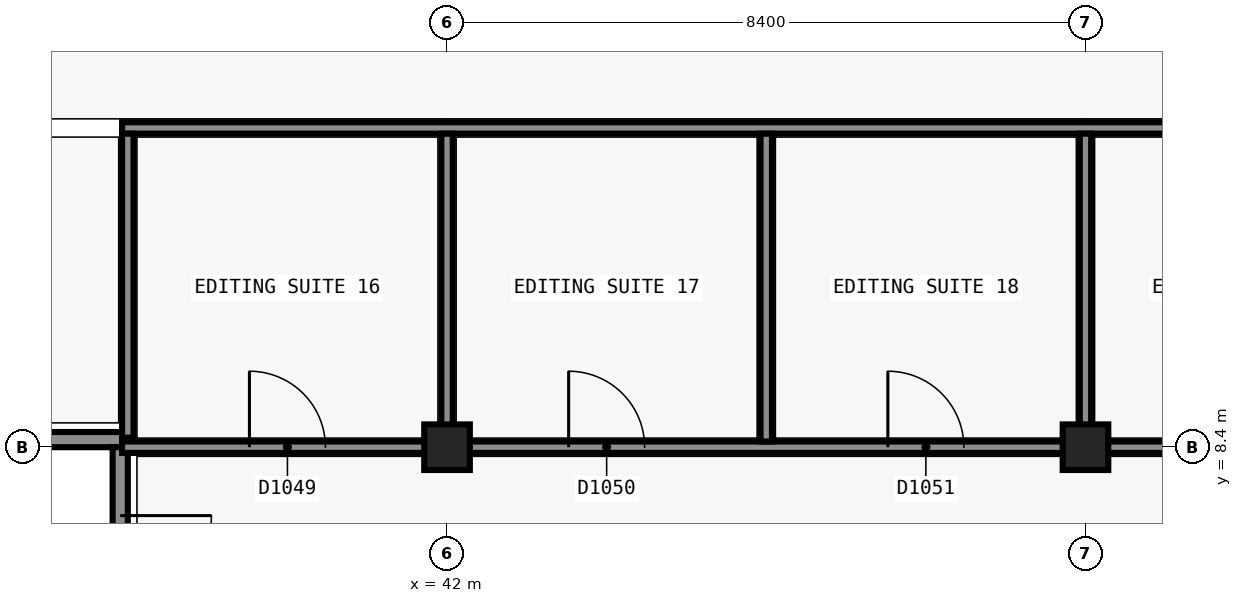
"""IFC4 building model, lengths in metres.
Left out: names, types, materials, properties, quantities, classifications, styles, units other than length and angle.
Written with IfcOpenShell. Run it as: python <this file> out.ifc"""

import sys

from ifc_helpers import new_model, si_unit, direction, frame, frame_2d, origin, origin_2d, place, context, subcontext, project, spatial, rectangle, extrude, element, fill, save


model = new_model("IFC4")
c1 = context("Model", 3, precision=1e-05, world=origin(), true_north=direction((0.0, 1.0)))
c2 = subcontext(c1, "Body", "Model", "MODEL_VIEW")
j1 = project(units=[si_unit("LENGTHUNIT", "METRE"), si_unit("PLANEANGLEUNIT", "RADIAN")], contexts=[c1])
p1 = place(None, origin())
s1 = spatial("IfcSite", under=j1, at=p1, CompositionType="ELEMENT")
p2 = place(p1, origin())
s2 = spatial("IfcBuilding", under=s1, at=p2, CompositionType="ELEMENT")
p3 = place(p2, frame((0.0, 0.0, 5.4)))
s3 = spatial("IfcBuildingStorey", under=s2, at=p3, CompositionType="ELEMENT", Elevation=5.4)
p4 = place(p3, frame((33.9, 8.5, 0.0), z_axis=(0.0, 0.0, 1.0), x_axis=(1.0, 0.0, 0.0)))
e1 = element("IfcWall", 1, at=p4, inside=s3, PredefinedType="SHEAR", context=c2, shape_type="SweptSolid", body=[
    extrude(rectangle(XDim=3.9, YDim=0.2, at=frame_2d((1.95, 0.0))), origin(), (0.0, 0.0, 1.0), 4.8),
])
p5 = place(p4, frame((1.2, 0.0, 0.0)))
e2 = element("IfcOpeningElement", 2, at=p5, cuts=e1, PredefinedType="OPENING", context=c2, shape_type="SweptSolid", body=[
    extrude(rectangle(XDim=1.2, YDim=2.1, at=frame_2d((0.6, 1.05))), frame((0.0, 0.11, 0.0), z_axis=(0.0, -1.0, 0.0), x_axis=(1.0, 0.0, 0.0)), (0.0, 0.0, 1.0), 0.22),
])
p6 = place(p3, frame((37.7, 8.4, 0.0), z_axis=(0.0, 0.0, 1.0), x_axis=(0.0, -1.0, 0.0)))
e3 = element("IfcWall", 3, at=p6, inside=s3, PredefinedType="SHEAR", context=c2, shape_type="SweptSolid", body=[
    extrude(rectangle(XDim=8.2, YDim=0.2, at=frame_2d((4.1, 0.0))), origin(), (0.0, 0.0, 1.0), 4.8),
])
p7 = place(p6, frame((0.9, 0.0, 0.0)))
e4 = element("IfcOpeningElement", 4, at=p7, cuts=e3, PredefinedType="OPENING", context=c2, shape_type="SweptSolid", body=[
    extrude(rectangle(XDim=1.2, YDim=2.1, at=frame_2d((0.6, 1.05))), frame((0.0, 0.11, 0.0), z_axis=(0.0, -1.0, 0.0), x_axis=(1.0, 0.0, 0.0)), (0.0, 0.0, 1.0), 0.22),
])
for number, where, z_axis, x_axis in (
    (5, (42.0, 8.4, 0.0), (0.0, 0.0, 1.0), (1.0, 0.0, 0.0)),
    (6, (50.4, 8.4, 0.0), (0.0, 0.0, 1.0), (1.0, 0.0, 0.0)),
):
    element("IfcColumn", number, at=place(p3, frame(where, z_axis=z_axis, x_axis=x_axis)), inside=s3, PredefinedType="COLUMN", context=c2, shape_type="SweptSolid", body=[
        extrude(rectangle(XDim=0.6, YDim=0.6, at=origin_2d()), origin(), (0.0, 0.0, 1.0), 4.8),
    ])
p8 = place(p3, frame((37.725, 8.4, 0.0), z_axis=(0.0, 0.0, 1.0), x_axis=(1.0, 0.0, 0.0)))
e7 = element("IfcWall", 7, at=p8, inside=s3, PredefinedType="PARTITIONING", context=c2, shape_type="SweptSolid", body=[
    extrude(rectangle(XDim=20.375, YDim=0.15, at=frame_2d((10.188, 0.0))), origin(), (0.0, 0.0, 1.0), 3.8),
])
p9 = place(p8, frame((1.675, 0.0, 0.0)))
e8 = element("IfcOpeningElement", 8, at=p9, cuts=e7, PredefinedType="OPENING", context=c2, shape_type="SweptSolid", body=[
    extrude(rectangle(XDim=1.0, YDim=2.1, at=frame_2d((0.5, 1.05))), frame((0.0, 0.085, 0.0), z_axis=(0.0, -1.0, 0.0), x_axis=(1.0, 0.0, 0.0)), (0.0, 0.0, 1.0), 0.17),
])
p10 = place(p8, frame((5.875, 0.0, 0.0)))
e9 = element("IfcOpeningElement", 9, at=p10, cuts=e7, PredefinedType="OPENING", context=c2, shape_type="SweptSolid", body=[
    extrude(rectangle(XDim=1.0, YDim=2.1, at=frame_2d((0.5, 1.05))), frame((0.0, 0.085, 0.0), z_axis=(0.0, -1.0, 0.0), x_axis=(1.0, 0.0, 0.0)), (0.0, 0.0, 1.0), 0.17),
])
p11 = place(p8, frame((10.075, 0.0, 0.0)))
e10 = element("IfcOpeningElement", 10, at=p11, cuts=e7, PredefinedType="OPENING", context=c2, shape_type="SweptSolid", body=[
    extrude(rectangle(XDim=1.0, YDim=2.1, at=frame_2d((0.5, 1.05))), frame((0.0, 0.085, 0.0), z_axis=(0.0, -1.0, 0.0), x_axis=(1.0, 0.0, 0.0)), (0.0, 0.0, 1.0), 0.17),
])
p12 = place(p8, frame((14.275, 0.0, 0.0)))
e11 = element("IfcOpeningElement", 11, at=p12, cuts=e7, PredefinedType="OPENING", context=c2, shape_type="SweptSolid", body=[
    extrude(rectangle(XDim=1.0, YDim=2.1, at=frame_2d((0.5, 1.05))), frame((0.0, 0.085, 0.0), z_axis=(0.0, -1.0, 0.0), x_axis=(1.0, 0.0, 0.0)), (0.0, 0.0, 1.0), 0.17),
])
p13 = place(p8, frame((18.475, 0.0, 0.0)))
e12 = element("IfcOpeningElement", 12, at=p13, cuts=e7, PredefinedType="OPENING", context=c2, shape_type="SweptSolid", body=[
    extrude(rectangle(XDim=1.0, YDim=2.1, at=frame_2d((0.5, 1.05))), frame((0.0, 0.085, 0.0), z_axis=(0.0, -1.0, 0.0), x_axis=(1.0, 0.0, 0.0)), (0.0, 0.0, 1.0), 0.17),
])
p14 = place(p3, frame((37.725, 12.6, 0.0), z_axis=(0.0, 0.0, 1.0), x_axis=(1.0, 0.0, 0.0)))
e13 = element("IfcWall", 13, at=p14, inside=s3, PredefinedType="PARTITIONING", context=c2, shape_type="SweptSolid", body=[
    extrude(rectangle(XDim=20.375, YDim=0.15, at=frame_2d((10.188, 0.0))), origin(), (0.0, 0.0, 1.0), 3.8),
])
p15 = place(p3, frame((37.8, 8.525, 0.0), z_axis=(0.0, 0.0, 1.0), x_axis=(0.0, 1.0, 0.0)))
e14 = element("IfcWall", 14, at=p15, inside=s3, PredefinedType="PARTITIONING", context=c2, shape_type="SweptSolid", body=[
    extrude(rectangle(XDim=4.0, YDim=0.15, at=frame_2d((2.0, 0.0))), origin(), (0.0, 0.0, 1.0), 4.0),
])
for number, where, z_axis, x_axis in (
    (15, (42.0, 8.475, 0.0), (0.0, 0.0, 1.0), (0.0, 1.0, 0.0)),
    (16, (46.2, 8.475, 0.0), (0.0, 0.0, 1.0), (0.0, 1.0, 0.0)),
    (17, (50.4, 8.475, 0.0), (0.0, 0.0, 1.0), (0.0, 1.0, 0.0)),
):
    element("IfcWall", number, at=place(p3, frame(where, z_axis=z_axis, x_axis=x_axis)), inside=s3, PredefinedType="PARTITIONING", context=c2, shape_type="SweptSolid", body=[
        extrude(rectangle(XDim=4.05, YDim=0.15, at=frame_2d((2.025, 0.0))), origin(), (0.0, 0.0, 1.0), 3.8),
    ])
p16 = place(p7, origin())
e18 = element("IfcDoor", 18, at=p16, inside=s3, OperationType="SINGLE_SWING_RIGHT", PredefinedType="DOOR", context=c2, shape_type="SweptSolid", body=[
    extrude(rectangle(XDim=1.2, YDim=2.1, at=frame_2d((0.6, 1.05))), frame((0.0, 0.025, 0.0), z_axis=(0.0, -1.0, 0.0), x_axis=(1.0, 0.0, 0.0)), (0.0, 0.0, 1.0), 0.05),
])
fill(e4, e18)
p17 = place(p9, origin())
e19 = element("IfcDoor", 19, at=p17, inside=s3, OperationType="SINGLE_SWING_RIGHT", PredefinedType="DOOR", context=c2, shape_type="SweptSolid", body=[
    extrude(rectangle(XDim=1.0, YDim=2.1, at=frame_2d((0.5, 1.05))), frame((0.0, 0.025, 0.0), z_axis=(0.0, -1.0, 0.0), x_axis=(1.0, 0.0, 0.0)), (0.0, 0.0, 1.0), 0.05),
])
fill(e8, e19)
p18 = place(p10, origin())
e20 = element("IfcDoor", 20, at=p18, inside=s3, OperationType="SINGLE_SWING_RIGHT", PredefinedType="DOOR", context=c2, shape_type="SweptSolid", body=[
    extrude(rectangle(XDim=1.0, YDim=2.1, at=frame_2d((0.5, 1.05))), frame((0.0, 0.025, 0.0), z_axis=(0.0, -1.0, 0.0), x_axis=(1.0, 0.0, 0.0)), (0.0, 0.0, 1.0), 0.05),
])
fill(e9, e20)
p19 = place(p11, origin())
e21 = element("IfcDoor", 21, at=p19, inside=s3, OperationType="SINGLE_SWING_LEFT", PredefinedType="DOOR", context=c2, shape_type="SweptSolid", body=[
    extrude(rectangle(XDim=1.0, YDim=2.1, at=frame_2d((0.5, 1.05))), frame((0.0, 0.025, 0.0), z_axis=(0.0, -1.0, 0.0), x_axis=(1.0, 0.0, 0.0)), (0.0, 0.0, 1.0), 0.05),
])
fill(e10, e21)
save(model, sys.argv[1])
